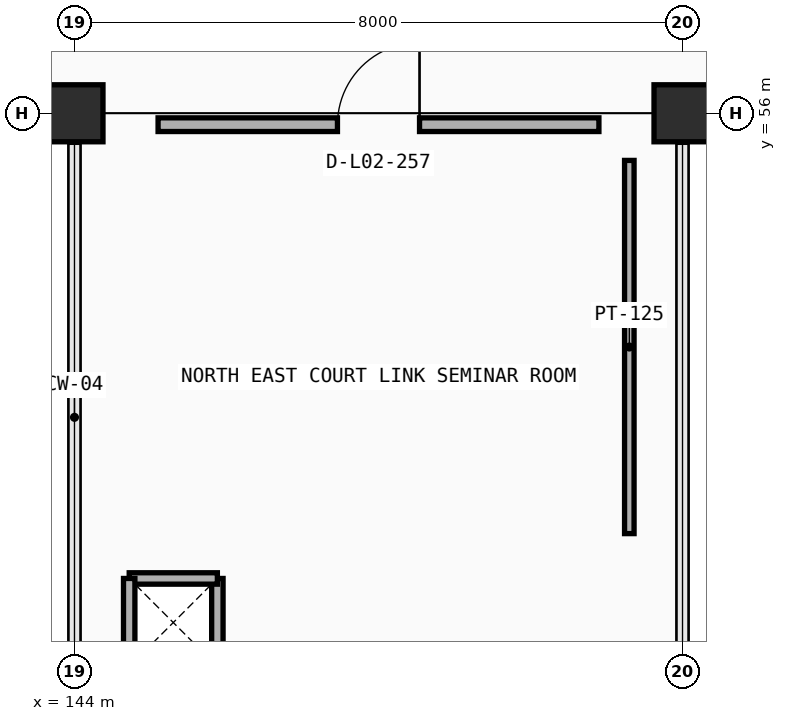
"""IFC4 building model, lengths in metres.
Left out: names, types, materials, properties, quantities, classifications, styles, units other than length and angle.
Written with IfcOpenShell. Run it as: python <this file> out.ifc"""

import sys

from ifc_helpers import new_model, si_unit, direction, frame, frame_2d, origin, origin_2d, place, context, subcontext, project, spatial, rectangle, extrude, element, fill, save


model = new_model("IFC4")
c1 = context("Model", 3, precision=1e-05, world=origin(), true_north=direction((0.0, 1.0)))
c2 = subcontext(c1, "Body", "Model", "MODEL_VIEW")
j1 = project(units=[si_unit("LENGTHUNIT", "METRE"), si_unit("PLANEANGLEUNIT", "RADIAN")], contexts=[c1])
p1 = place(None, origin())
s1 = spatial("IfcSite", under=j1, at=p1, CompositionType="ELEMENT")
p2 = place(p1, origin())
s2 = spatial("IfcBuilding", under=s1, at=p2, CompositionType="ELEMENT")
p3 = place(p2, frame((0.0, 0.0, 4.8)))
s3 = spatial("IfcBuildingStorey", under=s2, at=p3, CompositionType="ELEMENT", Elevation=4.8)
for number, where, z_axis, x_axis in (
    (1, (144.0, 56.0, 0.0), (0.0, 0.0, 1.0), (1.0, 0.0, 0.0)),
    (2, (152.0, 56.0, 0.0), (0.0, 0.0, 1.0), (1.0, 0.0, 0.0)),
):
    element("IfcColumn", number, at=place(p3, frame(where, z_axis=z_axis, x_axis=x_axis)), inside=s3, PredefinedType="COLUMN", context=c2, shape_type="SweptSolid", body=[
        extrude(rectangle(XDim=0.75, YDim=0.75, at=origin_2d()), origin(), (0.0, 0.0, 1.0), 4.8),
    ])
for number, where, z_axis, x_axis in (
    (3, (145.88, 48.72, 0.0), (0.0, 0.0, 1.0), (0.0, 1.0, 0.0)),
    (4, (145.88, 49.88, 0.0), (0.0, 0.0, 1.0), (-1.0, 0.0, 0.0)),
    (5, (144.72, 49.88, 0.0), (0.0, 0.0, 1.0), (0.0, -1.0, 0.0)),
):
    element("IfcWall", number, at=place(p3, frame(where, z_axis=z_axis, x_axis=x_axis)), inside=s3, PredefinedType="PARTITIONING", context=c2, shape_type="SweptSolid", body=[
        extrude(rectangle(XDim=1.16, YDim=0.15, at=frame_2d((0.58, 0.0))), origin(), (0.0, 0.0, 1.0), 4.5),
    ])
p4 = place(p3, frame((145.1, 55.85, 0.0), z_axis=(0.0, 0.0, 1.0), x_axis=(1.0, 0.0, 0.0)))
e6 = element("IfcWall", 6, at=p4, inside=s3, PredefinedType="PARTITIONING", context=c2, shape_type="SweptSolid", body=[
    extrude(rectangle(XDim=5.8, YDim=0.18, at=frame_2d((2.9, 0.0))), origin(), (0.0, 0.0, 1.0), 3.9),
])
p5 = place(p4, frame((2.36, 0.0, 0.0)))
e7 = element("IfcOpeningElement", 7, at=p5, cuts=e6, PredefinedType="OPENING", context=c2, shape_type="SweptSolid", body=[
    extrude(rectangle(XDim=1.08, YDim=2.15, at=frame_2d((0.54, 1.075))), frame((0.0, 0.1, 0.0), z_axis=(0.0, -1.0, 0.0), x_axis=(1.0, 0.0, 0.0)), (0.0, 0.0, 1.0), 0.2),
])
p6 = place(p3, frame((151.3, 50.47, 0.0), z_axis=(0.0, 0.0, 1.0), x_axis=(0.0, 1.0, 0.0)))
e8 = element("IfcWall", 8, at=p6, inside=s3, PredefinedType="PARTITIONING", context=c2, shape_type="SweptSolid", body=[
    extrude(rectangle(XDim=4.91, YDim=0.125, at=frame_2d((2.455, 0.0))), origin(), (0.0, 0.0, 1.0), 3.9),
])
p7 = place(p5, origin())
e9 = element("IfcDoor", 9, at=p7, inside=s3, OperationType="SINGLE_SWING_RIGHT", PredefinedType="DOOR", context=c2, shape_type="SweptSolid", body=[
    extrude(rectangle(XDim=1.08, YDim=2.15, at=frame_2d((0.54, 1.075))), frame((0.0, 0.025, 0.0), z_axis=(0.0, -1.0, 0.0), x_axis=(1.0, 0.0, 0.0)), (0.0, 0.0, 1.0), 0.05),
])
fill(e7, e9)
save(model, sys.argv[1])
